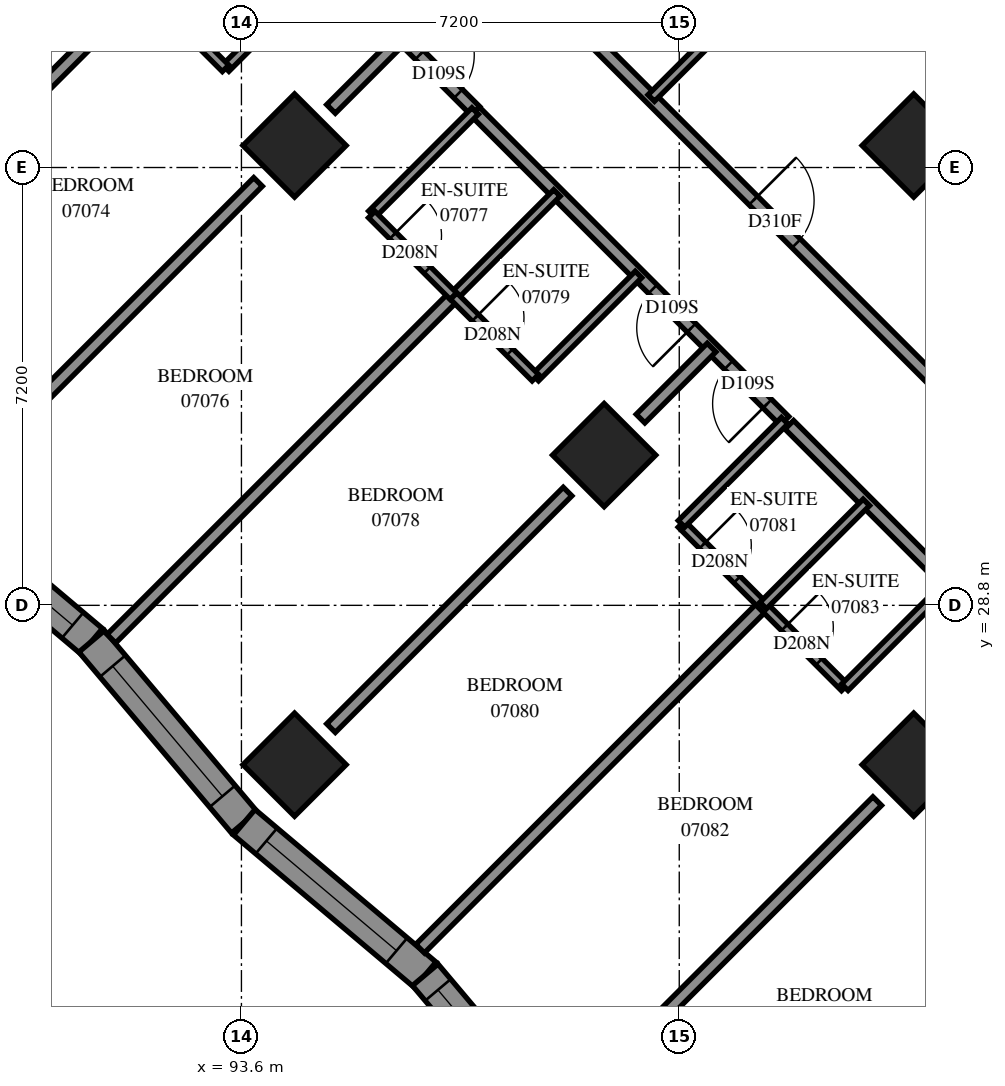
"""IFC4 building model, lengths in metres.
Left out: names, types, materials, properties, quantities, classifications, styles, units other than length and angle.
Written with IfcOpenShell. Run it as: python <this file> out.ifc"""

import sys

from ifc_helpers import new_model, si_unit, direction, frame, frame_2d, origin, origin_2d, place, context, subcontext, project, spatial, polyline, rectangle, outline, extrude, element, fill, save


model = new_model("IFC4")
c1 = context("Model", 3, precision=1e-05, world=origin(), true_north=direction((0.0, 1.0)))
c2 = subcontext(c1, "Body", "Model", "MODEL_VIEW")
j1 = project(units=[si_unit("LENGTHUNIT", "METRE"), si_unit("PLANEANGLEUNIT", "RADIAN")], contexts=[c1])
p1 = place(None, origin())
s1 = spatial("IfcSite", under=j1, at=p1, CompositionType="ELEMENT")
p2 = place(p1, origin())
s2 = spatial("IfcBuilding", under=s1, at=p2, CompositionType="ELEMENT")
p3 = place(p2, frame((0.0, 0.0, 30.4)))
s3 = spatial("IfcBuildingStorey", under=s2, at=p3, CompositionType="ELEMENT", Elevation=30.4)
for number, where, z_axis, x_axis in (
    (1, (94.474, 36.362, 0.0), (0.0, 0.0, 1.0), (0.707, -0.707, 0.0)),
    (2, (104.656, 36.362, 0.0), (0.0, 0.0, 1.0), (0.707, -0.707, 0.0)),
    (3, (99.565, 31.271, 0.0), (0.0, 0.0, 1.0), (0.707, -0.707, 0.0)),
    (4, (94.474, 26.18, 0.0), (0.0, 0.0, 1.0), (0.707, -0.707, 0.0)),
    (5, (104.656, 26.18, 0.0), (0.0, 0.0, 1.0), (0.707, -0.707, 0.0)),
):
    element("IfcColumn", number, at=place(p3, frame(where, z_axis=z_axis, x_axis=x_axis)), inside=s3, PredefinedType="COLUMN", context=c2, shape_type="SweptSolid", body=[
        extrude(rectangle(XDim=1.2, YDim=1.2, at=origin_2d()), origin(), (0.0, 0.0, 1.0), 3.1),
    ])
p4 = place(p3, frame((88.161, 30.718, 0.0), z_axis=(0.0, 0.0, 1.0), x_axis=(0.7645046987, -0.6446181549, 0.0)))
e6 = element("IfcWall", 6, at=p4, inside=s3, PredefinedType="SOLIDWALL", context=c2, shape_type="SweptSolid", body=[
    extrude(outline(polyline([(-0.023, -0.275), (3.869, -0.275), (3.916, 0.275), (0.023, 0.275), (-0.023, -0.275)])), origin(), (0.0, 0.0, 1.0), 3.1),
])
p5 = place(p4, frame((0.684, 0.0, 0.5)))
e7 = element("IfcOpeningElement", 7, at=p5, cuts=e6, PredefinedType="OPENING", context=c2, shape_type="SweptSolid", body=[
    extrude(rectangle(XDim=2.8, YDim=2.45, at=frame_2d((1.4, 1.225))), frame((0.0, 0.285, 0.0), z_axis=(0.0, -1.0, 0.0), x_axis=(1.0, 0.0, 0.0)), (0.0, 0.0, 1.0), 0.57),
])
p6 = place(p3, frame((91.137, 28.209, 0.0), z_axis=(0.0, 0.0, 1.0), x_axis=(0.6446181549, -0.7645046987, 0.0)))
e8 = element("IfcWall", 8, at=p6, inside=s3, PredefinedType="SOLIDWALL", context=c2, shape_type="SweptSolid", body=[
    extrude(outline(polyline([(0.023, -0.275), (3.916, -0.275), (3.869, 0.275), (-0.023, 0.275), (0.023, -0.275)])), origin(), (0.0, 0.0, 1.0), 3.1),
])
p7 = place(p6, frame((0.535, 0.0, 0.5)))
e9 = element("IfcOpeningElement", 9, at=p7, cuts=e8, PredefinedType="OPENING", context=c2, shape_type="SweptSolid", body=[
    extrude(rectangle(XDim=2.8, YDim=2.45, at=frame_2d((1.4, 1.225))), frame((0.0, 0.285, 0.0), z_axis=(0.0, -1.0, 0.0), x_axis=(1.0, 0.0, 0.0)), (0.0, 0.0, 1.0), 0.57),
])
p8 = place(p3, frame((93.647, 25.233, 0.0), z_axis=(0.0, 0.0, 1.0), x_axis=(0.7645046987, -0.6446181549, 0.0)))
e10 = element("IfcWall", 10, at=p8, inside=s3, PredefinedType="SOLIDWALL", context=c2, shape_type="SweptSolid", body=[
    extrude(outline(polyline([(-0.023, -0.275), (3.869, -0.275), (3.916, 0.275), (0.023, 0.275), (-0.023, -0.275)])), origin(), (0.0, 0.0, 1.0), 3.1),
])
p9 = place(p8, frame((0.476, 0.0, 0.5)))
e11 = element("IfcOpeningElement", 11, at=p9, cuts=e10, PredefinedType="OPENING", context=c2, shape_type="SweptSolid", body=[
    extrude(rectangle(XDim=2.8, YDim=2.45, at=frame_2d((1.4, 1.225))), frame((0.0, 0.285, 0.0), z_axis=(0.0, -1.0, 0.0), x_axis=(1.0, 0.0, 0.0)), (0.0, 0.0, 1.0), 0.57),
])
p10 = place(p3, frame((96.623, 22.724, 0.0), z_axis=(0.0, 0.0, 1.0), x_axis=(0.6446181549, -0.7645046987, 0.0)))
e12 = element("IfcWall", 12, at=p10, inside=s3, PredefinedType="SOLIDWALL", context=c2, shape_type="SweptSolid", body=[
    extrude(outline(polyline([(0.023, -0.275), (3.916, -0.275), (3.869, 0.275), (-0.023, 0.275), (0.023, -0.275)])), origin(), (0.0, 0.0, 1.0), 3.1),
])
p11 = place(p10, frame((0.324, 0.0, 0.5)))
e13 = element("IfcOpeningElement", 13, at=p11, cuts=e12, PredefinedType="OPENING", context=c2, shape_type="SweptSolid", body=[
    extrude(rectangle(XDim=2.8, YDim=2.45, at=frame_2d((1.4, 1.225))), frame((0.0, 0.285, 0.0), z_axis=(0.0, -1.0, 0.0), x_axis=(1.0, 0.0, 0.0)), (0.0, 0.0, 1.0), 0.57),
])
p12 = place(p3, frame((94.895, 42.581, 0.0), z_axis=(0.0, 0.0, 1.0), x_axis=(0.7071067812, -0.7071067812, 0.0)))
e14 = element("IfcWall", 14, at=p12, inside=s3, PredefinedType="PARTITIONING", context=c2, shape_type="SweptSolid", body=[
    extrude(rectangle(XDim=14.9, YDim=0.2, at=frame_2d((7.45, 0.0))), origin(), (0.0, 0.0, 1.0), 3.1),
])
p13 = place(p12, frame((2.8, 0.0, 0.0)))
e15 = element("IfcOpeningElement", 15, at=p13, cuts=e14, PredefinedType="OPENING", context=c2, shape_type="SweptSolid", body=[
    extrude(rectangle(XDim=0.9, YDim=2.1, at=frame_2d((0.45, 1.05))), frame((0.0, 0.11, 0.0), z_axis=(0.0, -1.0, 0.0), x_axis=(1.0, 0.0, 0.0)), (0.0, 0.0, 1.0), 0.22),
])
p14 = place(p12, frame((4.348, 0.0, 0.0)))
e16 = element("IfcOpeningElement", 16, at=p14, cuts=e14, PredefinedType="OPENING", context=c2, shape_type="SweptSolid", body=[
    extrude(rectangle(XDim=0.9, YDim=2.1, at=frame_2d((0.45, 1.05))), frame((0.0, 0.11, 0.0), z_axis=(0.0, -1.0, 0.0), x_axis=(1.0, 0.0, 0.0)), (0.0, 0.0, 1.0), 0.22),
])
p15 = place(p12, frame((10.073, 0.0, 0.0)))
e17 = element("IfcOpeningElement", 17, at=p15, cuts=e14, PredefinedType="OPENING", context=c2, shape_type="SweptSolid", body=[
    extrude(rectangle(XDim=1.0, YDim=2.1, at=frame_2d((0.5, 1.05))), frame((0.0, 0.11, 0.0), z_axis=(0.0, -1.0, 0.0), x_axis=(1.0, 0.0, 0.0)), (0.0, 0.0, 1.0), 0.22),
])
p16 = place(p3, frame((102.609, 31.769, 0.0), z_axis=(0.0, 0.0, 1.0), x_axis=(0.7071067812, -0.7071067812, 0.0)))
e18 = element("IfcWall", 18, at=p16, inside=s3, PredefinedType="PARTITIONING", context=c2, shape_type="SweptSolid", body=[
    extrude(rectangle(XDim=10.723, YDim=0.2, at=frame_2d((5.361, 0.0))), origin(), (0.0, 0.0, 1.0), 3.1),
])
p17 = place(p16, frame((4.15, 0.0, 0.0)))
e19 = element("IfcOpeningElement", 19, at=p17, cuts=e18, PredefinedType="OPENING", context=c2, shape_type="SweptSolid", body=[
    extrude(rectangle(XDim=0.9, YDim=2.1, at=frame_2d((0.45, 1.05))), frame((0.0, 0.11, 0.0), z_axis=(0.0, -1.0, 0.0), x_axis=(1.0, 0.0, 0.0)), (0.0, 0.0, 1.0), 0.22),
])
p18 = place(p16, frame((5.8, 0.0, 0.0)))
e20 = element("IfcOpeningElement", 20, at=p18, cuts=e18, PredefinedType="OPENING", context=c2, shape_type="SweptSolid", body=[
    extrude(rectangle(XDim=0.9, YDim=2.1, at=frame_2d((0.45, 1.05))), frame((0.0, 0.11, 0.0), z_axis=(0.0, -1.0, 0.0), x_axis=(1.0, 0.0, 0.0)), (0.0, 0.0, 1.0), 0.22),
])
p19 = place(p3, frame((86.838, 34.522, 0.0), z_axis=(0.0, 0.0, 1.0), x_axis=(0.7072154749, 0.7069980708, 0.0)))
e21 = element("IfcWall", 21, at=p19, inside=s3, PredefinedType="PARTITIONING", context=c2, shape_type="SweptSolid", body=[
    extrude(rectangle(XDim=9.2, YDim=0.2, at=frame_2d((4.6, 0.0))), origin(), (0.0, 0.0, 1.0), 3.1),
])
p20 = place(p3, frame((101.592, 18.033, 0.0), z_axis=(0.0, 0.0, 1.0), x_axis=(0.7072375867, 0.7069759514, 0.0)))
e22 = element("IfcWall", 22, at=p20, inside=s3, PredefinedType="PARTITIONING", context=c2, shape_type="SweptSolid", body=[
    extrude(rectangle(XDim=8.026, YDim=0.2, at=frame_2d((4.013, 0.0))), origin(), (0.0, 0.0, 1.0), 3.1),
])
p21 = place(p3, frame((86.336, 33.31, 0.0), z_axis=(0.0, 0.0, 1.0), x_axis=(0.7069819543, 0.707231586, 0.0)))
e23 = element("IfcWall", 23, at=p21, inside=s3, PredefinedType="PARTITIONING", context=c2, shape_type="SweptSolid", body=[
    extrude(rectangle(XDim=8.012, YDim=0.2, at=frame_2d((4.006, 0.0))), origin(), (0.0, 0.0, 1.0), 3.1),
])
p22 = place(p3, frame((96.538, 23.155, 0.0), z_axis=(0.0, 0.0, 1.0), x_axis=(0.7071130469, 0.7071005154, 0.0)))
e24 = element("IfcWall", 24, at=p22, inside=s3, PredefinedType="PARTITIONING", context=c2, shape_type="SweptSolid", body=[
    extrude(rectangle(XDim=7.98, YDim=0.2, at=frame_2d((3.99, 0.0))), origin(), (0.0, 0.0, 1.0), 3.1),
])
p23 = place(p3, frame((91.461, 28.252, 0.0), z_axis=(0.0, 0.0, 1.0), x_axis=(0.7072323284, 0.7069812117, 0.0)))
e25 = element("IfcWall", 25, at=p23, inside=s3, PredefinedType="PARTITIONING", context=c2, shape_type="SweptSolid", body=[
    extrude(rectangle(XDim=7.964, YDim=0.2, at=frame_2d((3.982, 0.0))), origin(), (0.0, 0.0, 1.0), 3.1),
])
p24 = place(p3, frame((102.531, 31.833, 0.0), z_axis=(0.0, 0.0, 1.0), x_axis=(-0.7070095491, 0.7072039999, 0.0)))
e26 = element("IfcWall", 26, at=p24, inside=s3, PredefinedType="PARTITIONING", context=c2, shape_type="SweptSolid", body=[
    extrude(rectangle(XDim=7.2, YDim=0.2, at=frame_2d((3.6, 0.0))), origin(), (0.0, 0.0, 1.0), 3.1),
])
p25 = place(p24, frame((2.165, 0.0, 0.0)))
e27 = element("IfcOpeningElement", 27, at=p25, cuts=e26, PredefinedType="OPENING", context=c2, shape_type="SweptSolid", body=[
    extrude(rectangle(XDim=0.9, YDim=2.1, at=frame_2d((0.45, 1.05))), frame((0.0, 0.11, 0.0), z_axis=(0.0, -1.0, 0.0), x_axis=(1.0, 0.0, 0.0)), (0.0, 0.0, 1.0), 0.22),
])
p26 = place(p24, frame((0.4, 0.0, 0.0)))
e28 = element("IfcOpeningElement", 28, at=p26, cuts=e26, PredefinedType="OPENING", context=c2, shape_type="SweptSolid", body=[
    extrude(rectangle(XDim=0.9, YDim=2.1, at=frame_2d((0.45, 1.05))), frame((0.0, 0.11, 0.0), z_axis=(0.0, -1.0, 0.0), x_axis=(1.0, 0.0, 0.0)), (0.0, 0.0, 1.0), 0.22),
])
for number, where, z_axis, x_axis in (
    (29, (89.981, 31.871, 0.0), (0.0, 0.0, 1.0), (0.707, 0.707, 0.0)),
    (30, (100.163, 21.689, 0.0), (0.0, 0.0, 1.0), (0.707, 0.707, 0.0)),
):
    element("IfcWall", number, at=place(p3, frame(where, z_axis=z_axis, x_axis=x_axis)), inside=s3, PredefinedType="PARTITIONING", context=c2, shape_type="SweptSolid", body=[
        extrude(rectangle(XDim=5.504, YDim=0.2, at=frame_2d((2.752, 0.0))), origin(), (0.0, 0.0, 1.0), 3.1),
    ])
p27 = place(p3, frame((95.073, 26.781, 0.0), z_axis=(0.0, 0.0, 1.0), x_axis=(0.7071067812, 0.7071067812, 0.0)))
e31 = element("IfcWall", 31, at=p27, inside=s3, PredefinedType="PARTITIONING", context=c2, shape_type="SweptSolid", body=[
    extrude(rectangle(XDim=5.501, YDim=0.2, at=frame_2d((2.751, 0.0))), origin(), (0.0, 0.0, 1.0), 3.1),
])
p28 = place(p3, frame((93.699, 40.679, 0.0), z_axis=(0.0, 0.0, 1.0), x_axis=(0.7071067812, -0.7071067812, 0.0)))
e32 = element("IfcWall", 32, at=p28, inside=s3, PredefinedType="PARTITIONING", context=c2, shape_type="SweptSolid", body=[
    extrude(rectangle(XDim=5.301, YDim=0.2, at=frame_2d((2.65, 0.0))), origin(), (0.0, 0.0, 1.0), 3.1),
])
p29 = place(p28, frame((2.242, 0.0, 0.0)))
e33 = element("IfcOpeningElement", 33, at=p29, cuts=e32, PredefinedType="OPENING", context=c2, shape_type="SweptSolid", body=[
    extrude(rectangle(XDim=0.9, YDim=2.1, at=frame_2d((0.45, 1.05))), frame((0.0, 0.11, 0.0), z_axis=(0.0, -1.0, 0.0), x_axis=(1.0, 0.0, 0.0)), (0.0, 0.0, 1.0), 0.22),
])
p30 = place(p28, frame((4.002, 0.0, 0.0)))
e34 = element("IfcOpeningElement", 34, at=p30, cuts=e32, PredefinedType="OPENING", context=c2, shape_type="SweptSolid", body=[
    extrude(rectangle(XDim=0.9, YDim=2.1, at=frame_2d((0.45, 1.05))), frame((0.0, 0.11, 0.0), z_axis=(0.0, -1.0, 0.0), x_axis=(1.0, 0.0, 0.0)), (0.0, 0.0, 1.0), 0.22),
])
p31 = place(p3, frame((100.836, 30.138, 0.0), z_axis=(0.0, 0.0, 1.0), x_axis=(0.7065802685, -0.7076329021, 0.0)))
e35 = element("IfcWall", 35, at=p31, inside=s3, PredefinedType="PARTITIONING", context=c2, shape_type="SweptSolid", body=[
    extrude(rectangle(XDim=3.8, YDim=0.15, at=frame_2d((1.9, 0.0))), origin(), (0.0, 0.0, 1.0), 3.1),
])
p32 = place(p31, frame((0.493, 0.0, 0.0)))
e36 = element("IfcOpeningElement", 36, at=p32, cuts=e35, PredefinedType="OPENING", context=c2, shape_type="SweptSolid", body=[
    extrude(rectangle(XDim=0.8, YDim=2.1, at=frame_2d((0.4, 1.05))), frame((0.0, 0.085, 0.0), z_axis=(0.0, -1.0, 0.0), x_axis=(1.0, 0.0, 0.0)), (0.0, 0.0, 1.0), 0.17),
])
p33 = place(p31, frame((2.402, 0.0, 0.0)))
e37 = element("IfcOpeningElement", 37, at=p33, cuts=e35, PredefinedType="OPENING", context=c2, shape_type="SweptSolid", body=[
    extrude(rectangle(XDim=0.8, YDim=2.1, at=frame_2d((0.4, 1.05))), frame((0.0, 0.085, 0.0), z_axis=(0.0, -1.0, 0.0), x_axis=(1.0, 0.0, 0.0)), (0.0, 0.0, 1.0), 0.17),
])
for number, where, z_axis, x_axis in (
    (38, (93.341, 37.635, 0.0), (0.0, 0.0, 1.0), (0.707, 0.707, 0.0)),
    (39, (95.745, 35.231, 0.0), (0.0, 0.0, 1.0), (0.707, 0.707, 0.0)),
    (40, (103.523, 27.453, 0.0), (0.0, 0.0, 1.0), (0.707, 0.707, 0.0)),
):
    element("IfcWall", number, at=place(p3, frame(where, z_axis=z_axis, x_axis=x_axis)), inside=s3, PredefinedType="PARTITIONING", context=c2, shape_type="SweptSolid", body=[
        extrude(rectangle(XDim=2.401, YDim=0.15, at=frame_2d((1.201, 0.0))), origin(), (0.0, 0.0, 1.0), 3.1),
    ])
for number, where, z_axis, x_axis in (
    (41, (100.34, 37.142, 0.0), (0.0, 0.0, 1.0), (0.708, 0.707, 0.0)),
    (42, (97.092, 33.884, 0.0), (0.0, 0.0, 1.0), (0.707, 0.708, 0.0)),
):
    element("IfcWall", number, at=place(p3, frame(where, z_axis=z_axis, x_axis=x_axis)), inside=s3, PredefinedType="PARTITIONING", context=c2, shape_type="SweptSolid", body=[
        extrude(rectangle(XDim=2.4, YDim=0.15, at=frame_2d((1.2, 0.0))), origin(), (0.0, 0.0, 1.0), 3.1),
    ])
for number, where, z_axis, x_axis in (
    (43, (100.837, 30.141, 0.0), (0.0, 0.0, 1.0), (0.707, 0.707, 0.0)),
    (44, (98.433, 32.545, 0.0), (0.0, 0.0, 1.0), (0.707, 0.707, 0.0)),
    (45, (102.181, 28.797, 0.0), (0.0, 0.0, 1.0), (0.707, 0.707, 0.0)),
):
    element("IfcWall", number, at=place(p3, frame(where, z_axis=z_axis, x_axis=x_axis)), inside=s3, PredefinedType="PARTITIONING", context=c2, shape_type="SweptSolid", body=[
        extrude(rectangle(XDim=2.398, YDim=0.15, at=frame_2d((1.199, 0.0))), origin(), (0.0, 0.0, 1.0), 3.1),
    ])
p34 = place(p3, frame((95.743, 35.227, 0.0), z_axis=(0.0, 0.0, 1.0), x_axis=(0.7071067812, -0.7071067812, 0.0)))
e46 = element("IfcWall", 46, at=p34, inside=s3, PredefinedType="PARTITIONING", context=c2, shape_type="SweptSolid", body=[
    extrude(rectangle(XDim=1.901, YDim=0.15, at=frame_2d((0.95, 0.0))), origin(), (0.0, 0.0, 1.0), 3.1),
])
p35 = place(p34, frame((0.491, 0.0, 0.0)))
e47 = element("IfcOpeningElement", 47, at=p35, cuts=e46, PredefinedType="OPENING", context=c2, shape_type="SweptSolid", body=[
    extrude(rectangle(XDim=0.8, YDim=2.1, at=frame_2d((0.4, 1.05))), frame((0.0, 0.085, 0.0), z_axis=(0.0, -1.0, 0.0), x_axis=(1.0, 0.0, 0.0)), (0.0, 0.0, 1.0), 0.17),
])
p36 = place(p3, frame((91.995, 38.975, 0.0), z_axis=(0.0, 0.0, 1.0), x_axis=(0.7071067812, -0.7071067812, 0.0)))
e48 = element("IfcWall", 48, at=p36, inside=s3, PredefinedType="PARTITIONING", context=c2, shape_type="SweptSolid", body=[
    extrude(rectangle(XDim=1.901, YDim=0.15, at=frame_2d((0.95, 0.0))), origin(), (0.0, 0.0, 1.0), 3.1),
])
p37 = place(p36, frame((0.523, 0.0, 0.0)))
e49 = element("IfcOpeningElement", 49, at=p37, cuts=e48, PredefinedType="OPENING", context=c2, shape_type="SweptSolid", body=[
    extrude(rectangle(XDim=0.8, YDim=2.1, at=frame_2d((0.4, 1.05))), frame((0.0, 0.085, 0.0), z_axis=(0.0, -1.0, 0.0), x_axis=(1.0, 0.0, 0.0)), (0.0, 0.0, 1.0), 0.17),
])
p38 = place(p3, frame((97.09, 33.886, 0.0), z_axis=(0.0, 0.0, 1.0), x_axis=(0.7076330979, -0.7065800724, 0.0)))
e50 = element("IfcWall", 50, at=p38, inside=s3, PredefinedType="PARTITIONING", context=c2, shape_type="SweptSolid", body=[
    extrude(rectangle(XDim=1.899, YDim=0.15, at=frame_2d((0.95, 0.0))), origin(), (0.0, 0.0, 1.0), 3.1),
])
p39 = place(p38, frame((0.504, 0.0, 0.0)))
e51 = element("IfcOpeningElement", 51, at=p39, cuts=e50, PredefinedType="OPENING", context=c2, shape_type="SweptSolid", body=[
    extrude(rectangle(XDim=0.8, YDim=2.1, at=frame_2d((0.4, 1.05))), frame((0.0, 0.085, 0.0), z_axis=(0.0, -1.0, 0.0), x_axis=(1.0, 0.0, 0.0)), (0.0, 0.0, 1.0), 0.17),
])
for number, where, z_axis, x_axis in (
    (52, (100.163, 31.871, 0.0), (0.0, 0.0, 1.0), (0.707, 0.707, 0.0)),
    (53, (95.073, 36.963, 0.0), (0.0, 0.0, 1.0), (0.707, 0.707, 0.0)),
):
    element("IfcWall", number, at=place(p3, frame(where, z_axis=z_axis, x_axis=x_axis)), inside=s3, PredefinedType="PARTITIONING", context=c2, shape_type="SweptSolid", body=[
        extrude(rectangle(XDim=1.652, YDim=0.2, at=frame_2d((0.826, 0.0))), origin(), (0.0, 0.0, 1.0), 3.1),
    ])
p40 = place(p5, origin())
e54 = element("IfcWindow", 54, at=p40, inside=s3, PartitioningType="SINGLE_PANEL", PredefinedType="WINDOW", context=c2, shape_type="SweptSolid", body=[
    extrude(rectangle(XDim=2.8, YDim=2.45, at=frame_2d((1.4, 1.225))), frame((0.0, 0.155, 0.0), z_axis=(0.0, -1.0, 0.0), x_axis=(1.0, 0.0, 0.0)), (0.0, 0.0, 1.0), 0.06),
])
fill(e7, e54)
p41 = place(p7, origin())
e55 = element("IfcWindow", 55, at=p41, inside=s3, PartitioningType="SINGLE_PANEL", PredefinedType="WINDOW", context=c2, shape_type="SweptSolid", body=[
    extrude(rectangle(XDim=2.8, YDim=2.45, at=frame_2d((1.4, 1.225))), frame((0.0, 0.155, 0.0), z_axis=(0.0, -1.0, 0.0), x_axis=(1.0, 0.0, 0.0)), (0.0, 0.0, 1.0), 0.06),
])
fill(e9, e55)
p42 = place(p9, origin())
e56 = element("IfcWindow", 56, at=p42, inside=s3, PartitioningType="SINGLE_PANEL", PredefinedType="WINDOW", context=c2, shape_type="SweptSolid", body=[
    extrude(rectangle(XDim=2.8, YDim=2.45, at=frame_2d((1.4, 1.225))), frame((0.0, 0.155, 0.0), z_axis=(0.0, -1.0, 0.0), x_axis=(1.0, 0.0, 0.0)), (0.0, 0.0, 1.0), 0.06),
])
fill(e11, e56)
p43 = place(p11, origin())
e57 = element("IfcWindow", 57, at=p43, inside=s3, PartitioningType="SINGLE_PANEL", PredefinedType="WINDOW", context=c2, shape_type="SweptSolid", body=[
    extrude(rectangle(XDim=2.8, YDim=2.45, at=frame_2d((1.4, 1.225))), frame((0.0, 0.155, 0.0), z_axis=(0.0, -1.0, 0.0), x_axis=(1.0, 0.0, 0.0)), (0.0, 0.0, 1.0), 0.06),
])
fill(e13, e57)
p44 = place(p15, origin())
e58 = element("IfcDoor", 58, at=p44, inside=s3, OperationType="SINGLE_SWING_RIGHT", PredefinedType="DOOR", context=c2, shape_type="SweptSolid", body=[
    extrude(rectangle(XDim=1.0, YDim=2.1, at=frame_2d((0.5, 1.05))), frame((0.0, 0.025, 0.0), z_axis=(0.0, -1.0, 0.0), x_axis=(1.0, 0.0, 0.0)), (0.0, 0.0, 1.0), 0.05),
])
fill(e17, e58)
p45 = place(p30, origin())
e59 = element("IfcDoor", 59, at=p45, inside=s3, OperationType="SINGLE_SWING_RIGHT", PredefinedType="DOOR", context=c2, shape_type="SweptSolid", body=[
    extrude(rectangle(XDim=0.9, YDim=2.1, at=frame_2d((0.45, 1.05))), frame((0.0, 0.025, 0.0), z_axis=(0.0, -1.0, 0.0), x_axis=(1.0, 0.0, 0.0)), (0.0, 0.0, 1.0), 0.05),
])
fill(e34, e59)
p46 = place(p35, origin())
e60 = element("IfcDoor", 60, at=p46, inside=s3, OperationType="SINGLE_SWING_RIGHT", PredefinedType="DOOR", context=c2, shape_type="SweptSolid", body=[
    extrude(rectangle(XDim=0.8, YDim=2.1, at=frame_2d((0.4, 1.05))), frame((0.0, 0.025, 0.0), z_axis=(0.0, -1.0, 0.0), x_axis=(1.0, 0.0, 0.0)), (0.0, 0.0, 1.0), 0.05),
])
fill(e47, e60)
p47 = place(p25, origin())
e61 = element("IfcDoor", 61, at=p47, inside=s3, OperationType="SINGLE_SWING_LEFT", PredefinedType="DOOR", context=c2, shape_type="SweptSolid", body=[
    extrude(rectangle(XDim=0.9, YDim=2.1, at=frame_2d((0.45, 1.05))), frame((0.0, 0.025, 0.0), z_axis=(0.0, -1.0, 0.0), x_axis=(1.0, 0.0, 0.0)), (0.0, 0.0, 1.0), 0.05),
])
fill(e27, e61)
p48 = place(p39, origin())
e62 = element("IfcDoor", 62, at=p48, inside=s3, OperationType="SINGLE_SWING_RIGHT", PredefinedType="DOOR", context=c2, shape_type="SweptSolid", body=[
    extrude(rectangle(XDim=0.8, YDim=2.1, at=frame_2d((0.4, 1.05))), frame((0.0, 0.025, 0.0), z_axis=(0.0, -1.0, 0.0), x_axis=(1.0, 0.0, 0.0)), (0.0, 0.0, 1.0), 0.05),
])
fill(e51, e62)
p49 = place(p26, origin())
e63 = element("IfcDoor", 63, at=p49, inside=s3, OperationType="SINGLE_SWING_RIGHT", PredefinedType="DOOR", context=c2, shape_type="SweptSolid", body=[
    extrude(rectangle(XDim=0.9, YDim=2.1, at=frame_2d((0.45, 1.05))), frame((0.0, 0.025, 0.0), z_axis=(0.0, -1.0, 0.0), x_axis=(1.0, 0.0, 0.0)), (0.0, 0.0, 1.0), 0.05),
])
fill(e28, e63)
p50 = place(p32, origin())
e64 = element("IfcDoor", 64, at=p50, inside=s3, OperationType="SINGLE_SWING_RIGHT", PredefinedType="DOOR", context=c2, shape_type="SweptSolid", body=[
    extrude(rectangle(XDim=0.8, YDim=2.1, at=frame_2d((0.4, 1.05))), frame((0.0, 0.025, 0.0), z_axis=(0.0, -1.0, 0.0), x_axis=(1.0, 0.0, 0.0)), (0.0, 0.0, 1.0), 0.05),
])
fill(e36, e64)
p51 = place(p33, origin())
e65 = element("IfcDoor", 65, at=p51, inside=s3, OperationType="SINGLE_SWING_RIGHT", PredefinedType="DOOR", context=c2, shape_type="SweptSolid", body=[
    extrude(rectangle(XDim=0.8, YDim=2.1, at=frame_2d((0.4, 1.05))), frame((0.0, 0.025, 0.0), z_axis=(0.0, -1.0, 0.0), x_axis=(1.0, 0.0, 0.0)), (0.0, 0.0, 1.0), 0.05),
])
fill(e37, e65)
save(model, sys.argv[1])
